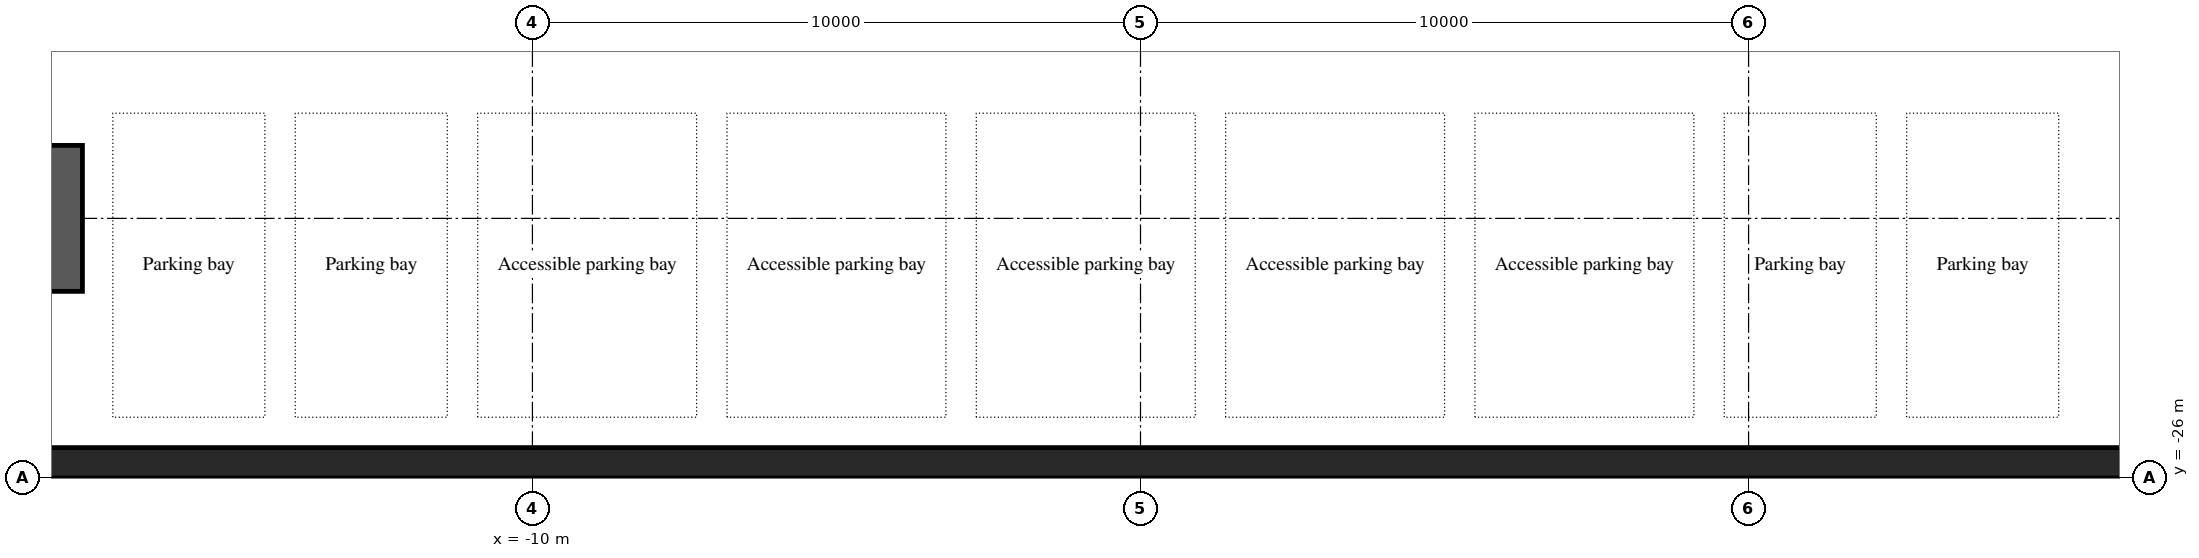
"""IFC4 building model, lengths in metres.
Left out: names, types, materials, properties, quantities, classifications, styles, units other than length and angle.
Written with IfcOpenShell. Run it as: python <this file> out.ifc"""

import sys

from ifc_helpers import new_model, si_unit, direction, frame, frame_2d, origin, origin_2d, place, context, subcontext, project, spatial, rectangle, extrude, element, save


model = new_model("IFC4")
c1 = context("Model", 3, precision=1e-05, world=origin(), true_north=direction((0.0, 1.0)))
c2 = subcontext(c1, "Body", "Model", "MODEL_VIEW")
j1 = project(units=[si_unit("LENGTHUNIT", "METRE"), si_unit("PLANEANGLEUNIT", "RADIAN")], contexts=[c1])
p1 = place(None, origin())
s1 = spatial("IfcSite", under=j1, at=p1, CompositionType="ELEMENT")
p2 = place(p1, origin())
s2 = spatial("IfcBuilding", under=s1, at=p2, CompositionType="ELEMENT")
p3 = place(p2, frame((0.0, 0.0, -4.2)))
s3 = spatial("IfcBuildingStorey", under=s2, at=p3, CompositionType="ELEMENT", Elevation=-4.2)
p4 = place(p3, frame((-19.2, -21.73, -0.38), z_axis=(0.0, 0.0, 1.0), x_axis=(1.0, 0.0, 0.0)))
e1 = element("IfcColumn", 1, at=p4, inside=s3, PredefinedType="COLUMN", context=c2, shape_type="SweptSolid", body=[
    extrude(rectangle(XDim=3.6, YDim=2.4, at=origin_2d()), origin(), (0.0, 0.0, 1.0), 4.16),
])
p5 = place(p3, frame((-40.0, -25.75, -0.38), z_axis=(0.0, 0.0, 1.0), x_axis=(1.0, 0.0, 0.0)))
e2 = element("IfcWall", 2, at=p5, inside=s3, PredefinedType="SOLIDWALL", context=c2, shape_type="SweptSolid", body=[
    extrude(rectangle(XDim=80.0, YDim=0.5, at=frame_2d((40.0, 0.0))), origin(), (0.0, 0.0, 1.0), 3.88),
])
save(model, sys.argv[1])
